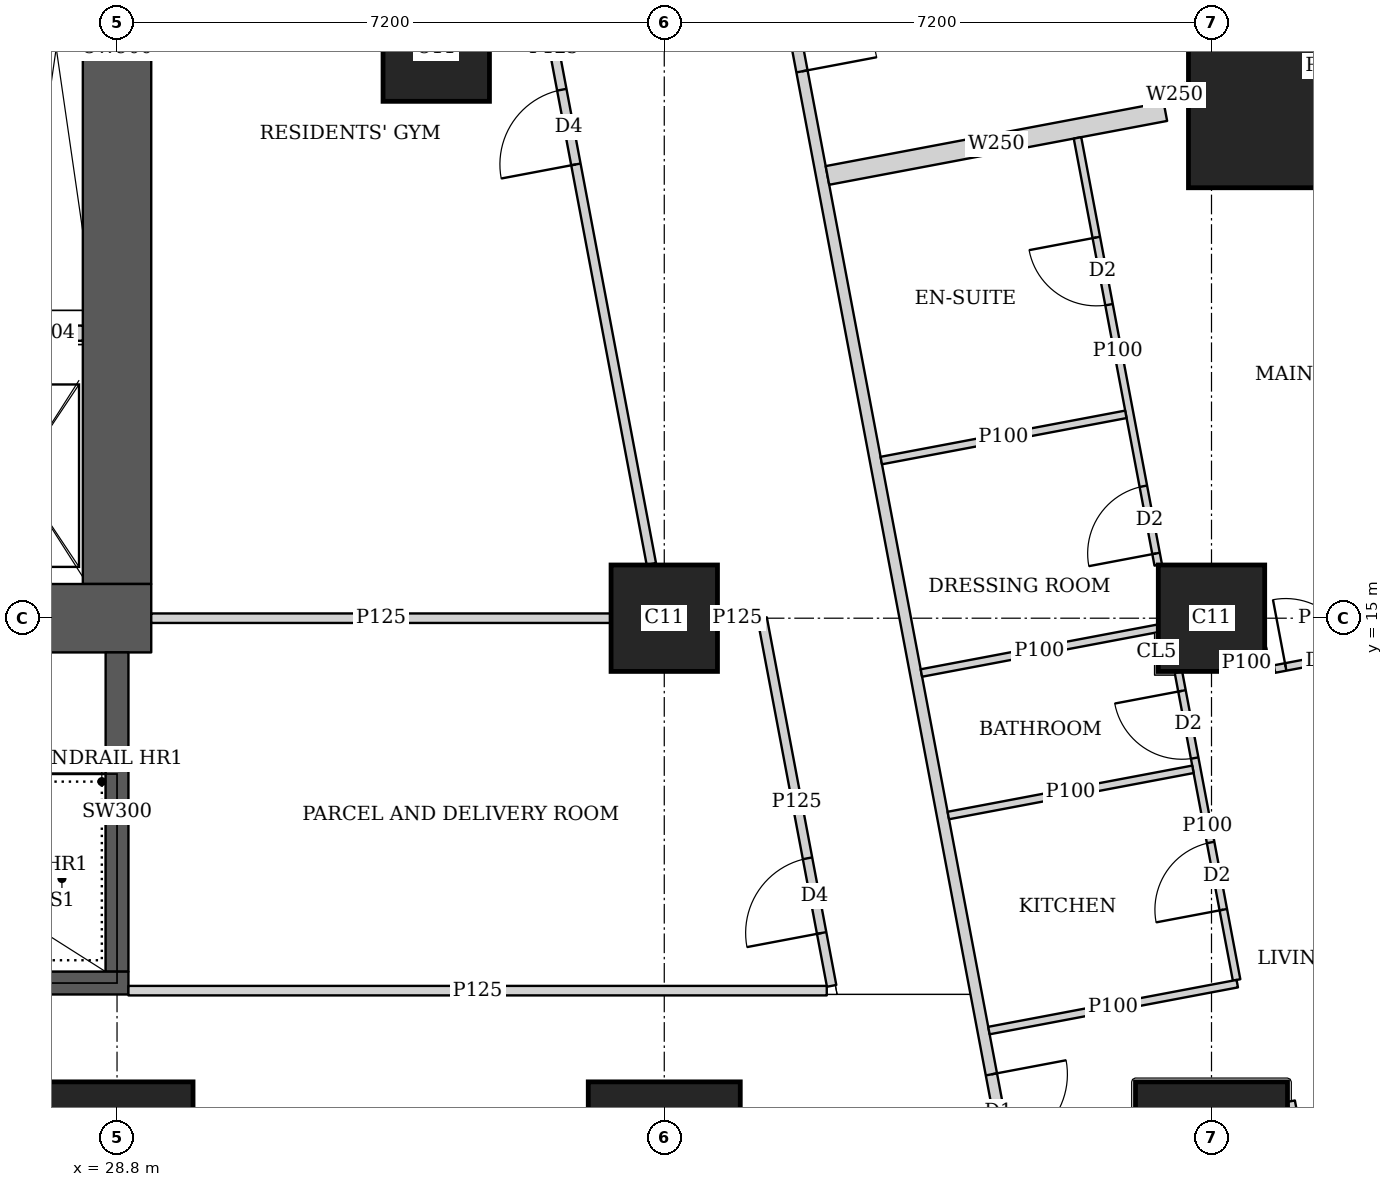
"""IFC4 building model, lengths in metres.
Left out: names, types, materials, properties, quantities, classifications, styles, units other than length and angle.
Written with IfcOpenShell. Run it as: python <this file> out.ifc"""

import sys

from ifc_helpers import new_model, si_unit, direction, frame, frame_2d, origin, origin_2d, place, context, subcontext, project, spatial, rectangle, extrude, element, fill, save


model = new_model("IFC4")
c1 = context("Model", 3, precision=1e-05, world=origin(), true_north=direction((0.0, 1.0)))
c2 = subcontext(c1, "Body", "Model", "MODEL_VIEW")
j1 = project(units=[si_unit("LENGTHUNIT", "METRE"), si_unit("PLANEANGLEUNIT", "RADIAN")], contexts=[c1])
p1 = place(None, origin())
s1 = spatial("IfcSite", under=j1, at=p1, CompositionType="ELEMENT")
p2 = place(p1, origin())
s2 = spatial("IfcBuilding", under=s1, at=p2, CompositionType="ELEMENT")
p3 = place(p2, frame((0.0, 0.0, 292.85)))
s3 = spatial("IfcBuildingStorey", under=s2, at=p3, CompositionType="ELEMENT", Elevation=292.85)
for number, where, z_axis, x_axis in (
    (1, (28.8, 7.9, 0.0), (0.0, 0.0, 1.0), (1.0, 0.0, 0.0)),
    (2, (36.0, 7.9, 0.0), (0.0, 0.0, 1.0), (1.0, 0.0, 0.0)),
    (3, (43.2, 7.9, 0.0), (0.0, 0.0, 1.0), (1.0, 0.0, 0.0)),
):
    element("IfcColumn", number, at=place(p3, frame(where, z_axis=z_axis, x_axis=x_axis)), inside=s3, PredefinedType="COLUMN", context=c2, shape_type="SweptSolid", body=[
        extrude(rectangle(XDim=2.0, YDim=2.0, at=origin_2d()), origin(), (0.0, 0.0, 1.0), 3.75),
    ])
for number, where, z_axis, x_axis in (
    (4, (36.0, 15.0, 0.0), (0.0, 0.0, 1.0), (1.0, 0.0, 0.0)),
    (5, (43.2, 15.0, 0.0), (0.0, 0.0, 1.0), (1.0, 0.0, 0.0)),
    (6, (33.0, 22.5, 0.0), (0.0, 0.0, 1.0), (1.0, 0.0, 0.0)),
):
    element("IfcColumn", number, at=place(p3, frame(where, z_axis=z_axis, x_axis=x_axis)), inside=s3, PredefinedType="COLUMN", context=c2, shape_type="SweptSolid", body=[
        extrude(rectangle(XDim=1.4, YDim=1.4, at=origin_2d()), origin(), (0.0, 0.0, 1.0), 3.75),
    ])
p4 = place(p3, frame((44.697, 22.263, 0.0), z_axis=(0.0, 0.0, 1.0), x_axis=(1.0, 0.0, 0.0)))
e7 = element("IfcColumn", 7, at=p4, inside=s3, PredefinedType="COLUMN", context=c2, shape_type="SweptSolid", body=[
    extrude(rectangle(XDim=3.6, YDim=3.2, at=origin_2d()), origin(), (0.0, 0.0, 1.0), 3.75),
])
p5 = place(p3, frame((13.95, 15.0, 0.0), z_axis=(0.0, 0.0, 1.0), x_axis=(1.0, 0.0, 0.0)))
e8 = element("IfcWall", 8, at=p5, inside=s3, PredefinedType="SHEAR", context=c2, shape_type="SweptSolid", body=[
    extrude(rectangle(XDim=15.3, YDim=0.9, at=frame_2d((7.65, 0.0))), origin(), (0.0, 0.0, 1.0), 3.75),
])
p6 = place(p5, frame((4.45, 0.0, 0.0)))
e9 = element("IfcOpeningElement", 9, at=p6, cuts=e8, PredefinedType="OPENING", context=c2, shape_type="SweptSolid", body=[
    extrude(rectangle(XDim=1.8, YDim=2.1, at=frame_2d((0.9, 1.05))), frame((0.0, 0.46, 0.0), z_axis=(0.0, -1.0, 0.0), x_axis=(1.0, 0.0, 0.0)), (0.0, 0.0, 1.0), 0.92),
])
p7 = place(p5, frame((10.7, 0.0, 0.0)))
e10 = element("IfcOpeningElement", 10, at=p7, cuts=e8, PredefinedType="OPENING", context=c2, shape_type="SweptSolid", body=[
    extrude(rectangle(XDim=1.1, YDim=2.1, at=frame_2d((0.55, 1.05))), frame((0.0, 0.46, 0.0), z_axis=(0.0, -1.0, 0.0), x_axis=(1.0, 0.0, 0.0)), (0.0, 0.0, 1.0), 0.92),
])
p8 = place(p3, frame((28.8, 15.45, 0.0), z_axis=(0.0, 0.0, 1.0), x_axis=(0.0, 1.0, 0.0)))
e11 = element("IfcWall", 11, at=p8, inside=s3, PredefinedType="SHEAR", context=c2, shape_type="SweptSolid", body=[
    extrude(rectangle(XDim=14.1, YDim=0.9, at=frame_2d((7.05, 0.0))), origin(), (0.0, 0.0, 1.0), 3.75),
])
p9 = place(p3, frame((21.45, 10.2, 0.0), z_axis=(0.0, 0.0, 1.0), x_axis=(1.0, 0.0, 0.0)))
e12 = element("IfcWall", 12, at=p9, inside=s3, PredefinedType="SHEAR", context=c2, shape_type="SweptSolid", body=[
    extrude(rectangle(XDim=7.5, YDim=0.3, at=frame_2d((3.75, 0.0))), origin(), (0.0, 0.0, 1.0), 3.75),
])
p10 = place(p9, frame((1.2, 0.0, 0.0)))
e13 = element("IfcOpeningElement", 13, at=p10, cuts=e12, PredefinedType="OPENING", context=c2, shape_type="SweptSolid", body=[
    extrude(rectangle(XDim=1.1, YDim=2.1, at=frame_2d((0.55, 1.05))), frame((0.0, 0.16, 0.0), z_axis=(0.0, -1.0, 0.0), x_axis=(1.0, 0.0, 0.0)), (0.0, 0.0, 1.0), 0.32),
])
p11 = place(p3, frame((28.8, 10.35, 0.0), z_axis=(0.0, 0.0, 1.0), x_axis=(0.0, 1.0, 0.0)))
e14 = element("IfcWall", 14, at=p11, inside=s3, PredefinedType="SHEAR", context=c2, shape_type="SweptSolid", body=[
    extrude(rectangle(XDim=4.2, YDim=0.3, at=frame_2d((2.1, 0.0))), origin(), (0.0, 0.0, 1.0), 3.75),
])
p12 = place(p3, frame((49.684, 7.832, 0.0), z_axis=(0.0, 0.0, 1.0), x_axis=(-0.185616669694, 0.982622232565, 0.0)))
e15 = element("IfcWall", 15, at=p12, inside=s3, PredefinedType="SOLIDWALL", context=c2, shape_type="SweptSolid", body=[
    extrude(rectangle(XDim=36.0, YDim=0.2, at=frame_2d((18.0, 0.0))), origin(), (0.0, 0.0, 1.0), 3.4),
])
p13 = place(p12, frame((2.518, 0.0, 0.9)))
e16 = element("IfcOpeningElement", 16, at=p13, cuts=e15, PredefinedType="OPENING", context=c2, shape_type="SweptSolid", body=[
    extrude(rectangle(XDim=2.4, YDim=1.5, at=frame_2d((1.2, 0.75))), frame((0.0, 0.11, 0.0), z_axis=(0.0, -1.0, 0.0), x_axis=(1.0, 0.0, 0.0)), (0.0, 0.0, 1.0), 0.22),
])
p14 = place(p12, frame((8.444, 0.0, 0.9)))
e17 = element("IfcOpeningElement", 17, at=p14, cuts=e15, PredefinedType="OPENING", context=c2, shape_type="SweptSolid", body=[
    extrude(rectangle(XDim=1.8, YDim=1.5, at=frame_2d((0.9, 0.75))), frame((0.0, 0.11, 0.0), z_axis=(0.0, -1.0, 0.0), x_axis=(1.0, 0.0, 0.0)), (0.0, 0.0, 1.0), 0.22),
])
p15 = place(p12, frame((12.261, 0.0, 0.9)))
e18 = element("IfcOpeningElement", 18, at=p15, cuts=e15, PredefinedType="OPENING", context=c2, shape_type="SweptSolid", body=[
    extrude(rectangle(XDim=1.8, YDim=1.5, at=frame_2d((0.9, 0.75))), frame((0.0, 0.11, 0.0), z_axis=(0.0, -1.0, 0.0), x_axis=(1.0, 0.0, 0.0)), (0.0, 0.0, 1.0), 0.22),
])
p16 = place(p12, frame((16.078, 0.0, 0.9)))
e19 = element("IfcOpeningElement", 19, at=p16, cuts=e15, PredefinedType="OPENING", context=c2, shape_type="SweptSolid", body=[
    extrude(rectangle(XDim=1.8, YDim=1.5, at=frame_2d((0.9, 0.75))), frame((0.0, 0.11, 0.0), z_axis=(0.0, -1.0, 0.0), x_axis=(1.0, 0.0, 0.0)), (0.0, 0.0, 1.0), 0.22),
])
p17 = place(p12, frame((19.894, 0.0, 0.9)))
e20 = element("IfcOpeningElement", 20, at=p17, cuts=e15, PredefinedType="OPENING", context=c2, shape_type="SweptSolid", body=[
    extrude(rectangle(XDim=1.8, YDim=1.5, at=frame_2d((0.9, 0.75))), frame((0.0, 0.11, 0.0), z_axis=(0.0, -1.0, 0.0), x_axis=(1.0, 0.0, 0.0)), (0.0, 0.0, 1.0), 0.22),
])
p18 = place(p12, frame((23.71, 0.0, 0.9)))
e21 = element("IfcOpeningElement", 21, at=p18, cuts=e15, PredefinedType="OPENING", context=c2, shape_type="SweptSolid", body=[
    extrude(rectangle(XDim=1.8, YDim=1.5, at=frame_2d((0.9, 0.75))), frame((0.0, 0.11, 0.0), z_axis=(0.0, -1.0, 0.0), x_axis=(1.0, 0.0, 0.0)), (0.0, 0.0, 1.0), 0.22),
])
p19 = place(p12, frame((27.526, 0.0, 0.9)))
e22 = element("IfcOpeningElement", 22, at=p19, cuts=e15, PredefinedType="OPENING", context=c2, shape_type="SweptSolid", body=[
    extrude(rectangle(XDim=1.8, YDim=1.5, at=frame_2d((0.9, 0.75))), frame((0.0, 0.11, 0.0), z_axis=(0.0, -1.0, 0.0), x_axis=(1.0, 0.0, 0.0)), (0.0, 0.0, 1.0), 0.22),
])
p20 = place(p12, frame((32.046, 0.0, 0.9)))
e23 = element("IfcOpeningElement", 23, at=p20, cuts=e15, PredefinedType="OPENING", context=c2, shape_type="SweptSolid", body=[
    extrude(rectangle(XDim=1.8, YDim=1.5, at=frame_2d((0.9, 0.75))), frame((0.0, 0.11, 0.0), z_axis=(0.0, -1.0, 0.0), x_axis=(1.0, 0.0, 0.0)), (0.0, 0.0, 1.0), 0.22),
])
p21 = place(p3, frame((34.036, 42.186, 0.0), z_axis=(0.0, 0.0, 1.0), x_axis=(0.185593518645, -0.9826266055, 0.0)))
e24 = element("IfcWall", 24, at=p21, inside=s3, PredefinedType="SOLIDWALL", context=c2, shape_type="SweptSolid", body=[
    extrude(rectangle(XDim=35.961, YDim=0.15, at=frame_2d((17.98, 0.0))), origin(), (0.0, 0.0, 1.0), 2.4),
])
p22 = place(p21, frame((19.345, 0.0, 0.0)))
e25 = element("IfcOpeningElement", 25, at=p22, cuts=e24, PredefinedType="OPENING", context=c2, shape_type="SweptSolid", body=[
    extrude(rectangle(XDim=1.0, YDim=2.1, at=frame_2d((0.5, 1.05))), frame((0.0, 0.085, 0.0), z_axis=(0.0, -1.0, 0.0), x_axis=(1.0, 0.0, 0.0)), (0.0, 0.0, 1.0), 0.17),
])
p23 = place(p21, frame((33.774, 0.0, 0.0)))
e26 = element("IfcOpeningElement", 26, at=p23, cuts=e24, PredefinedType="OPENING", context=c2, shape_type="SweptSolid", body=[
    extrude(rectangle(XDim=1.0, YDim=2.1, at=frame_2d((0.5, 1.05))), frame((0.0, 0.085, 0.0), z_axis=(0.0, -1.0, 0.0), x_axis=(1.0, 0.0, 0.0)), (0.0, 0.0, 1.0), 0.17),
])
p24 = place(p3, frame((44.248, 8.646, 0.0), z_axis=(0.0, 0.0, 1.0), x_axis=(0.185417594585, -0.982659816833, 0.0)))
e27 = element("IfcWall", 27, at=p24, inside=s3, PredefinedType="PARTITIONING", context=c2, shape_type="SweptSolid", body=[
    extrude(rectangle(XDim=1.828, YDim=0.1, at=frame_2d((0.914, 0.0))), origin(), (0.0, 0.0, 1.0), 1.95),
])
p25 = place(p3, frame((42.873, 21.918, 0.0), z_axis=(0.0, 0.0, 1.0), x_axis=(-0.982431406936, -0.186624035603, 0.0)))
e28 = element("IfcWall", 28, at=p25, inside=s3, PredefinedType="SOLIDWALL", context=c2, shape_type="SweptSolid", body=[
    extrude(rectangle(XDim=0.322, YDim=0.25, at=frame_2d((0.161, 0.0))), origin(), (0.0, 0.0, 1.0), 2.4),
])
p26 = place(p3, frame((42.593, 21.665, 0.0), z_axis=(0.0, 0.0, 1.0), x_axis=(-0.982612837616, -0.185666398014, 0.0)))
e29 = element("IfcWall", 29, at=p26, inside=s3, PredefinedType="SOLIDWALL", context=c2, shape_type="SweptSolid", body=[
    extrude(rectangle(XDim=4.525, YDim=0.25, at=frame_2d((2.262, 0.0))), origin(), (0.0, 0.0, 1.0), 2.4),
])
p27 = place(p3, frame((45.304, 14.572, 0.0), z_axis=(0.0, 0.0, 1.0), x_axis=(-0.982602741717, -0.185719821156, 0.0)))
e30 = element("IfcWall", 30, at=p27, inside=s3, PredefinedType="PARTITIONING", context=c2, shape_type="SweptSolid", body=[
    extrude(rectangle(XDim=1.297, YDim=0.1, at=frame_2d((0.649, 0.0))), origin(), (0.0, 0.0, 1.0), 3.4),
])
p28 = place(p27, frame((0.248, 0.0, 0.0)))
e31 = element("IfcOpeningElement", 31, at=p28, cuts=e30, PredefinedType="OPENING", context=c2, shape_type="SweptSolid", body=[
    extrude(rectangle(XDim=0.9, YDim=2.1, at=frame_2d((0.45, 1.05))), frame((0.0, 0.06, 0.0), z_axis=(0.0, -1.0, 0.0), x_axis=(1.0, 0.0, 0.0)), (0.0, 0.0, 1.0), 0.12),
])
p29 = place(p3, frame((43.949, 14.485, 0.0), z_axis=(0.0, 0.0, 1.0), x_axis=(0.188651210932, -0.982044154106, 0.0)))
e32 = element("IfcWall", 32, at=p29, inside=s3, PredefinedType="PARTITIONING", context=c2, shape_type="SweptSolid", body=[
    extrude(rectangle(XDim=0.138, YDim=0.1, at=frame_2d((0.069, 0.0))), origin(), (0.0, 0.0, 1.0), 3.4),
])
p30 = place(p3, frame((42.073, 17.682, 0.0), z_axis=(0.0, 0.0, 1.0), x_axis=(-0.982620626894, -0.185625169636, 0.0)))
e33 = element("IfcWall", 33, at=p30, inside=s3, PredefinedType="PARTITIONING", context=c2, shape_type="SweptSolid", body=[
    extrude(rectangle(XDim=3.275, YDim=0.1, at=frame_2d((1.637, 0.0))), origin(), (0.0, 0.0, 1.0), 2.5),
])
p31 = place(p3, frame((42.49, 14.866, 0.0), z_axis=(0.0, 0.0, 1.0), x_axis=(-0.982621285075, -0.185621685472, 0.0)))
e34 = element("IfcWall", 34, at=p31, inside=s3, PredefinedType="PARTITIONING", context=c2, shape_type="SweptSolid", body=[
    extrude(rectangle(XDim=3.162, YDim=0.1, at=frame_2d((1.581, 0.0))), origin(), (0.0, 0.0, 1.0), 2.5),
])
p32 = place(p3, frame((42.956, 13.012, 0.0), z_axis=(0.0, 0.0, 1.0), x_axis=(-0.982630897129, -0.185570795135, 0.0)))
e35 = element("IfcWall", 35, at=p32, inside=s3, PredefinedType="PARTITIONING", context=c2, shape_type="SweptSolid", body=[
    extrude(rectangle(XDim=3.276, YDim=0.1, at=frame_2d((1.638, 0.0))), origin(), (0.0, 0.0, 1.0), 2.5),
])
p33 = place(p3, frame((43.539, 10.192, 0.0), z_axis=(0.0, 0.0, 1.0), x_axis=(-0.982633623707, -0.185556356831, 0.0)))
e36 = element("IfcWall", 36, at=p33, inside=s3, PredefinedType="PARTITIONING", context=c2, shape_type="SweptSolid", body=[
    extrude(rectangle(XDim=3.325, YDim=0.1, at=frame_2d((1.663, 0.0))), origin(), (0.0, 0.0, 1.0), 2.5),
])
p34 = place(p3, frame((41.437, 21.319, 0.0), z_axis=(0.0, 0.0, 1.0), x_axis=(0.185742368638, -0.982598479794, 0.0)))
e37 = element("IfcWall", 37, at=p34, inside=s3, PredefinedType="PARTITIONING", context=c2, shape_type="SweptSolid", body=[
    extrude(rectangle(XDim=5.718, YDim=0.1, at=frame_2d((2.859, 0.0))), origin(), (0.0, 0.0, 1.0), 3.4),
])
p35 = place(p34, frame((1.333, 0.0, 0.0)))
e38 = element("IfcOpeningElement", 38, at=p35, cuts=e37, PredefinedType="OPENING", context=c2, shape_type="SweptSolid", body=[
    extrude(rectangle(XDim=0.9, YDim=2.1, at=frame_2d((0.45, 1.05))), frame((0.0, 0.06, 0.0), z_axis=(0.0, -1.0, 0.0), x_axis=(1.0, 0.0, 0.0)), (0.0, 0.0, 1.0), 0.12),
])
p36 = place(p34, frame((4.664, 0.0, 0.0)))
e39 = element("IfcOpeningElement", 39, at=p36, cuts=e37, PredefinedType="OPENING", context=c2, shape_type="SweptSolid", body=[
    extrude(rectangle(XDim=0.9, YDim=2.1, at=frame_2d((0.45, 1.05))), frame((0.0, 0.06, 0.0), z_axis=(0.0, -1.0, 0.0), x_axis=(1.0, 0.0, 0.0)), (0.0, 0.0, 1.0), 0.12),
])
p37 = place(p3, frame((42.765, 14.29, 0.0), z_axis=(0.0, 0.0, 1.0), x_axis=(0.185679870644, -0.982610291844, 0.0)))
e40 = element("IfcWall", 40, at=p37, inside=s3, PredefinedType="PARTITIONING", context=c2, shape_type="SweptSolid", body=[
    extrude(rectangle(XDim=4.121, YDim=0.1, at=frame_2d((2.061, 0.0))), origin(), (0.0, 0.0, 1.0), 2.5),
])
p38 = place(p37, frame((0.25, 0.0, 0.0)))
e41 = element("IfcOpeningElement", 41, at=p38, cuts=e40, PredefinedType="OPENING", context=c2, shape_type="SweptSolid", body=[
    extrude(rectangle(XDim=0.9, YDim=2.1, at=frame_2d((0.45, 1.05))), frame((0.0, 0.06, 0.0), z_axis=(0.0, -1.0, 0.0), x_axis=(1.0, 0.0, 0.0)), (0.0, 0.0, 1.0), 0.12),
])
p39 = place(p37, frame((2.28, 0.0, 0.0)))
e42 = element("IfcOpeningElement", 42, at=p39, cuts=e40, PredefinedType="OPENING", context=c2, shape_type="SweptSolid", body=[
    extrude(rectangle(XDim=0.9, YDim=2.1, at=frame_2d((0.45, 1.05))), frame((0.0, 0.06, 0.0), z_axis=(0.0, -1.0, 0.0), x_axis=(1.0, 0.0, 0.0)), (0.0, 0.0, 1.0), 0.12),
])
p40 = place(p3, frame((28.95, 10.1, 0.0), z_axis=(0.0, 0.0, 1.0), x_axis=(1.0, 0.0, 0.0)))
e43 = element("IfcWall", 43, at=p40, inside=s3, PredefinedType="PARTITIONING", context=c2, shape_type="SweptSolid", body=[
    extrude(rectangle(XDim=9.188, YDim=0.125, at=frame_2d((4.594, 0.0))), origin(), (0.0, 0.0, 1.0), 2.5),
])
p41 = place(p3, frame((38.202, 10.163, 0.0), z_axis=(0.0, 0.0, 1.0), x_axis=(-0.185641892853, 0.982617467593, 0.0)))
e44 = element("IfcWall", 44, at=p41, inside=s3, PredefinedType="PARTITIONING", context=c2, shape_type="SweptSolid", body=[
    extrude(rectangle(XDim=4.922, YDim=0.125, at=frame_2d((2.461, 0.0))), origin(), (0.0, 0.0, 1.0), 2.5),
])
p42 = place(p41, frame((0.708, 0.0, 0.0)))
e45 = element("IfcOpeningElement", 45, at=p42, cuts=e44, PredefinedType="OPENING", context=c2, shape_type="SweptSolid", body=[
    extrude(rectangle(XDim=1.0, YDim=2.1, at=frame_2d((0.5, 1.05))), frame((0.0, 0.073, 0.0), z_axis=(0.0, -1.0, 0.0), x_axis=(1.0, 0.0, 0.0)), (0.0, 0.0, 1.0), 0.145),
])
p43 = place(p3, frame((35.83, 15.713, 0.0), z_axis=(0.0, 0.0, 1.0), x_axis=(-0.185534724166, 0.982637708481, 0.0)))
e46 = element("IfcWall", 46, at=p43, inside=s3, PredefinedType="PARTITIONING", context=c2, shape_type="SweptSolid", body=[
    extrude(rectangle(XDim=13.814, YDim=0.125, at=frame_2d((6.907, 0.0))), origin(), (0.0, 0.0, 1.0), 2.4),
])
p44 = place(p43, frame((5.35, 0.0, 0.0)))
e47 = element("IfcOpeningElement", 47, at=p44, cuts=e46, PredefinedType="OPENING", context=c2, shape_type="SweptSolid", body=[
    extrude(rectangle(XDim=1.0, YDim=2.1, at=frame_2d((0.5, 1.05))), frame((0.0, 0.073, 0.0), z_axis=(0.0, -1.0, 0.0), x_axis=(1.0, 0.0, 0.0)), (0.0, 0.0, 1.0), 0.145),
])
p45 = place(p3, frame((29.25, 15.0, 0.0), z_axis=(0.0, 0.0, 1.0), x_axis=(1.0, 0.0, 0.0)))
e48 = element("IfcWall", 48, at=p45, inside=s3, PredefinedType="PARTITIONING", context=c2, shape_type="SweptSolid", body=[
    extrude(rectangle(XDim=6.049, YDim=0.125, at=frame_2d((3.024, 0.0))), origin(), (0.0, 0.0, 1.0), 2.5),
])
p46 = place(p3, frame((36.701, 15.0, 0.0), z_axis=(0.0, 0.0, 1.0), x_axis=(1.0, 0.0, 0.0)))
e49 = element("IfcWall", 49, at=p46, inside=s3, PredefinedType="PARTITIONING", context=c2, shape_type="SweptSolid", body=[
    extrude(rectangle(XDim=0.526, YDim=0.125, at=frame_2d((0.263, 0.0))), origin(), (0.0, 0.0, 1.0), 2.5),
])
p47 = place(p3, frame((23.0, 13.05, 0.0), z_axis=(0.0, 0.0, 1.0), x_axis=(1.0, 0.0, 0.0)))
e50 = element("IfcWall", 50, at=p47, inside=s3, PredefinedType="SHEAR", context=c2, shape_type="SweptSolid", body=[
    extrude(rectangle(XDim=5.8, YDim=0.2, at=frame_2d((2.9, 0.0))), origin(), (0.0, 0.0, 1.0), 3.75),
])
p48 = place(p3, frame((27.4, 18.75, 0.0), z_axis=(0.0, 0.0, 1.0), x_axis=(1.0, 0.0, 0.0)))
e51 = element("IfcWall", 51, at=p48, inside=s3, PredefinedType="SOLIDWALL", context=c2, shape_type="SweptSolid", body=[
    extrude(rectangle(XDim=0.95, YDim=0.2, at=frame_2d((0.475, 0.0))), origin(), (0.0, 0.0, 1.0), 3.4),
])
p49 = place(p22, origin())
e52 = element("IfcDoor", 52, at=p49, inside=s3, OperationType="SINGLE_SWING_RIGHT", PredefinedType="DOOR", context=c2, shape_type="SweptSolid", body=[
    extrude(rectangle(XDim=1.0, YDim=2.1, at=frame_2d((0.5, 1.05))), frame((0.0, 0.025, 0.0), z_axis=(0.0, -1.0, 0.0), x_axis=(1.0, 0.0, 0.0)), (0.0, 0.0, 1.0), 0.05),
])
fill(e25, e52)
p50 = place(p28, origin())
e53 = element("IfcDoor", 53, at=p50, inside=s3, OperationType="SINGLE_SWING_LEFT", PredefinedType="DOOR", context=c2, shape_type="SweptSolid", body=[
    extrude(rectangle(XDim=0.9, YDim=2.1, at=frame_2d((0.45, 1.05))), frame((0.0, 0.025, 0.0), z_axis=(0.0, -1.0, 0.0), x_axis=(1.0, 0.0, 0.0)), (0.0, 0.0, 1.0), 0.05),
])
fill(e31, e53)
p51 = place(p35, origin())
e54 = element("IfcDoor", 54, at=p51, inside=s3, OperationType="SINGLE_SWING_RIGHT", PredefinedType="DOOR", context=c2, shape_type="SweptSolid", body=[
    extrude(rectangle(XDim=0.9, YDim=2.1, at=frame_2d((0.45, 1.05))), frame((0.0, 0.025, 0.0), z_axis=(0.0, -1.0, 0.0), x_axis=(1.0, 0.0, 0.0)), (0.0, 0.0, 1.0), 0.05),
])
fill(e38, e54)
p52 = place(p36, origin())
e55 = element("IfcDoor", 55, at=p52, inside=s3, OperationType="SINGLE_SWING_LEFT", PredefinedType="DOOR", context=c2, shape_type="SweptSolid", body=[
    extrude(rectangle(XDim=0.9, YDim=2.1, at=frame_2d((0.45, 1.05))), frame((0.0, 0.025, 0.0), z_axis=(0.0, -1.0, 0.0), x_axis=(1.0, 0.0, 0.0)), (0.0, 0.0, 1.0), 0.05),
])
fill(e39, e55)
p53 = place(p38, origin())
e56 = element("IfcDoor", 56, at=p53, inside=s3, OperationType="SINGLE_SWING_RIGHT", PredefinedType="DOOR", context=c2, shape_type="SweptSolid", body=[
    extrude(rectangle(XDim=0.9, YDim=2.1, at=frame_2d((0.45, 1.05))), frame((0.0, 0.025, 0.0), z_axis=(0.0, -1.0, 0.0), x_axis=(1.0, 0.0, 0.0)), (0.0, 0.0, 1.0), 0.05),
])
fill(e41, e56)
p54 = place(p39, origin())
e57 = element("IfcDoor", 57, at=p54, inside=s3, OperationType="SINGLE_SWING_LEFT", PredefinedType="DOOR", context=c2, shape_type="SweptSolid", body=[
    extrude(rectangle(XDim=0.9, YDim=2.1, at=frame_2d((0.45, 1.05))), frame((0.0, 0.025, 0.0), z_axis=(0.0, -1.0, 0.0), x_axis=(1.0, 0.0, 0.0)), (0.0, 0.0, 1.0), 0.05),
])
fill(e42, e57)
p55 = place(p23, origin())
e58 = element("IfcDoor", 58, at=p55, inside=s3, OperationType="SINGLE_SWING_LEFT", PredefinedType="DOOR", context=c2, shape_type="SweptSolid", body=[
    extrude(rectangle(XDim=1.0, YDim=2.1, at=frame_2d((0.5, 1.05))), frame((0.0, 0.025, 0.0), z_axis=(0.0, -1.0, 0.0), x_axis=(1.0, 0.0, 0.0)), (0.0, 0.0, 1.0), 0.05),
])
fill(e26, e58)
p56 = place(p42, origin())
e59 = element("IfcDoor", 59, at=p56, inside=s3, OperationType="SINGLE_SWING_LEFT", PredefinedType="DOOR", context=c2, shape_type="SweptSolid", body=[
    extrude(rectangle(XDim=1.0, YDim=2.1, at=frame_2d((0.5, 1.05))), frame((0.0, 0.025, 0.0), z_axis=(0.0, -1.0, 0.0), x_axis=(1.0, 0.0, 0.0)), (0.0, 0.0, 1.0), 0.05),
])
fill(e45, e59)
p57 = place(p44, origin())
e60 = element("IfcDoor", 60, at=p57, inside=s3, OperationType="SINGLE_SWING_LEFT", PredefinedType="DOOR", context=c2, shape_type="SweptSolid", body=[
    extrude(rectangle(XDim=1.0, YDim=2.1, at=frame_2d((0.5, 1.05))), frame((0.0, 0.025, 0.0), z_axis=(0.0, -1.0, 0.0), x_axis=(1.0, 0.0, 0.0)), (0.0, 0.0, 1.0), 0.05),
])
fill(e47, e60)
save(model, sys.argv[1])
